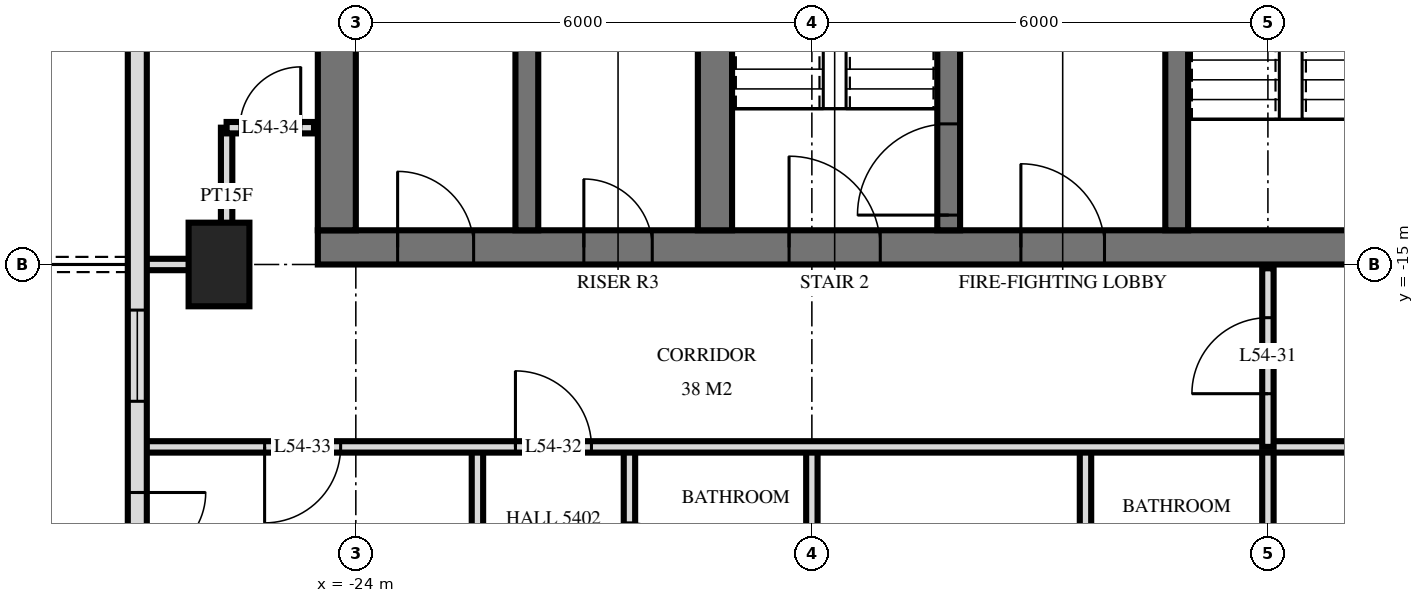
"""IFC4 building model, lengths in metres.
Left out: names, types, materials, properties, quantities, classifications, styles, units other than length and angle.
Written with IfcOpenShell. Run it as: python <this file> out.ifc"""

import sys

from ifc_helpers import new_model, si_unit, direction, frame, frame_2d, origin, origin_2d, place, context, subcontext, project, spatial, rectangle, extrude, element, fill, save


model = new_model("IFC4")
c1 = context("Model", 3, precision=1e-05, world=origin(), true_north=direction((0.0, 1.0)))
c2 = subcontext(c1, "Body", "Model", "MODEL_VIEW")
j1 = project(units=[si_unit("LENGTHUNIT", "METRE"), si_unit("PLANEANGLEUNIT", "RADIAN")], contexts=[c1])
p1 = place(None, origin())
s1 = spatial("IfcSite", under=j1, at=p1, CompositionType="ELEMENT")
p2 = place(p1, origin())
s2 = spatial("IfcBuilding", under=s1, at=p2, CompositionType="ELEMENT")
p3 = place(p2, frame((0.0, 0.0, 208.1)))
s3 = spatial("IfcBuildingStorey", under=s2, at=p3, CompositionType="ELEMENT", Elevation=208.1)
p4 = place(p3, frame((-25.8, -15.0, 0.0), z_axis=(0.0, 0.0, 1.0), x_axis=(0.0, 1.0, 0.0)))
e1 = element("IfcColumn", 1, at=p4, inside=s3, PredefinedType="COLUMN", context=c2, shape_type="SweptSolid", body=[
    extrude(rectangle(XDim=1.1, YDim=0.8, at=origin_2d()), origin(), (0.0, 0.0, 1.0), 3.5),
])
p5 = place(p3, frame((-24.5, -14.775, 0.0), z_axis=(0.0, 0.0, 1.0), x_axis=(1.0, 0.0, 0.0)))
e2 = element("IfcWall", 2, at=p5, inside=s3, PredefinedType="SHEAR", context=c2, shape_type="SweptSolid", body=[
    extrude(rectangle(XDim=14.5, YDim=0.45, at=frame_2d((7.25, 0.0))), origin(), (0.0, 0.0, 1.0), 3.5),
])
p6 = place(p5, frame((6.2, 0.0, 0.0)))
e3 = element("IfcOpeningElement", 3, at=p6, cuts=e2, PredefinedType="OPENING", context=c2, shape_type="SweptSolid", body=[
    extrude(rectangle(XDim=1.2, YDim=2.1, at=frame_2d((0.6, 1.05))), frame((0.0, 0.235, 0.0), z_axis=(0.0, -1.0, 0.0), x_axis=(1.0, 0.0, 0.0)), (0.0, 0.0, 1.0), 0.47),
])
p7 = place(p5, frame((9.25, 0.0, 0.0)))
e4 = element("IfcOpeningElement", 4, at=p7, cuts=e2, PredefinedType="OPENING", context=c2, shape_type="SweptSolid", body=[
    extrude(rectangle(XDim=1.1, YDim=2.1, at=frame_2d((0.55, 1.05))), frame((0.0, 0.235, 0.0), z_axis=(0.0, -1.0, 0.0), x_axis=(1.0, 0.0, 0.0)), (0.0, 0.0, 1.0), 0.47),
])
p8 = place(p5, frame((3.5, 0.0, 0.0)))
e5 = element("IfcOpeningElement", 5, at=p8, cuts=e2, PredefinedType="OPENING", context=c2, shape_type="SweptSolid", body=[
    extrude(rectangle(XDim=0.9, YDim=2.1, at=frame_2d((0.45, 1.05))), frame((0.0, 0.235, 0.0), z_axis=(0.0, -1.0, 0.0), x_axis=(1.0, 0.0, 0.0)), (0.0, 0.0, 1.0), 0.47),
])
p9 = place(p5, frame((1.05, 0.0, 0.0)))
e6 = element("IfcOpeningElement", 6, at=p9, cuts=e2, PredefinedType="OPENING", context=c2, shape_type="SweptSolid", body=[
    extrude(rectangle(XDim=1.0, YDim=2.1, at=frame_2d((0.5, 1.05))), frame((0.0, 0.235, 0.0), z_axis=(0.0, -1.0, 0.0), x_axis=(1.0, 0.0, 0.0)), (0.0, 0.0, 1.0), 0.47),
])
p10 = place(p3, frame((-24.25, -14.55, 0.0), z_axis=(0.0, 0.0, 1.0), x_axis=(0.0, 1.0, 0.0)))
e7 = element("IfcWall", 7, at=p10, inside=s3, PredefinedType="SHEAR", context=c2, shape_type="SweptSolid", body=[
    extrude(rectangle(XDim=14.1, YDim=0.5, at=frame_2d((7.05, 0.0))), origin(), (0.0, 0.0, 1.0), 3.5),
])
p11 = place(p3, frame((-13.2, -14.55, 0.0), z_axis=(0.0, 0.0, 1.0), x_axis=(0.0, 1.0, 0.0)))
e8 = element("IfcWall", 8, at=p11, inside=s3, PredefinedType="SHEAR", context=c2, shape_type="SweptSolid", body=[
    extrude(rectangle(XDim=5.4, YDim=0.3, at=frame_2d((2.7, 0.0))), origin(), (0.0, 0.0, 1.0), 3.5),
])
p12 = place(p11, frame((4.0, 0.0, 0.0)))
e9 = element("IfcOpeningElement", 9, at=p12, cuts=e8, PredefinedType="OPENING", context=c2, shape_type="SweptSolid", body=[
    extrude(rectangle(XDim=1.2, YDim=2.1, at=frame_2d((0.6, 1.05))), frame((0.0, 0.16, 0.0), z_axis=(0.0, -1.0, 0.0), x_axis=(1.0, 0.0, 0.0)), (0.0, 0.0, 1.0), 0.32),
])
p13 = place(p3, frame((-16.2, -14.55, 0.0), z_axis=(0.0, 0.0, 1.0), x_axis=(0.0, 1.0, 0.0)))
e10 = element("IfcWall", 10, at=p13, inside=s3, PredefinedType="SHEAR", context=c2, shape_type="SweptSolid", body=[
    extrude(rectangle(XDim=5.4, YDim=0.3, at=frame_2d((2.7, 0.0))), origin(), (0.0, 0.0, 1.0), 3.5),
])
p14 = place(p13, frame((0.2, 0.0, 0.0)))
e11 = element("IfcOpeningElement", 11, at=p14, cuts=e10, PredefinedType="OPENING", context=c2, shape_type="SweptSolid", body=[
    extrude(rectangle(XDim=1.2, YDim=2.1, at=frame_2d((0.6, 1.05))), frame((0.0, 0.16, 0.0), z_axis=(0.0, -1.0, 0.0), x_axis=(1.0, 0.0, 0.0)), (0.0, 0.0, 1.0), 0.32),
])
p15 = place(p3, frame((-19.275, -14.55, 0.0), z_axis=(0.0, 0.0, 1.0), x_axis=(0.0, 1.0, 0.0)))
e12 = element("IfcWall", 12, at=p15, inside=s3, PredefinedType="SHEAR", context=c2, shape_type="SweptSolid", body=[
    extrude(rectangle(XDim=5.4, YDim=0.45, at=frame_2d((2.7, 0.0))), origin(), (0.0, 0.0, 1.0), 3.5),
])
p16 = place(p3, frame((-21.75, -14.55, 0.0), z_axis=(0.0, 0.0, 1.0), x_axis=(0.0, 1.0, 0.0)))
e13 = element("IfcWall", 13, at=p16, inside=s3, PredefinedType="SHEAR", context=c2, shape_type="SweptSolid", body=[
    extrude(rectangle(XDim=5.4, YDim=0.3, at=frame_2d((2.7, 0.0))), origin(), (0.0, 0.0, 1.0), 3.5),
])
p17 = place(p3, frame((-26.875, -3.325, 0.0), z_axis=(0.0, 0.0, 1.0), x_axis=(0.0, -1.0, 0.0)))
e14 = element("IfcWall", 14, at=p17, inside=s3, PredefinedType="SOLIDWALL", context=c2, shape_type="SweptSolid", body=[
    extrude(rectangle(XDim=21.551, YDim=0.25, at=frame_2d((10.775, 0.0))), origin(), (0.0, 0.0, 1.0), 3.22),
])
p18 = place(p17, frame((6.65, 0.0, 0.0)))
e15 = element("IfcOpeningElement", 15, at=p18, cuts=e14, PredefinedType="OPENING", context=c2, shape_type="SweptSolid", body=[
    extrude(rectangle(XDim=1.8, YDim=2.4, at=frame_2d((0.9, 1.2))), frame((0.0, 0.135, 0.0), z_axis=(0.0, -1.0, 0.0), x_axis=(1.0, 0.0, 0.0)), (0.0, 0.0, 1.0), 0.27),
])
p19 = place(p17, frame((12.275, 0.0, 0.9)))
e16 = element("IfcOpeningElement", 16, at=p19, cuts=e14, PredefinedType="OPENING", context=c2, shape_type="SweptSolid", body=[
    extrude(rectangle(XDim=1.2, YDim=1.5, at=frame_2d((0.6, 0.75))), frame((0.0, 0.135, 0.0), z_axis=(0.0, -1.0, 0.0), x_axis=(1.0, 0.0, 0.0)), (0.0, 0.0, 1.0), 0.27),
])
p20 = place(p17, frame((14.675, 0.0, 0.0)))
e17 = element("IfcOpeningElement", 17, at=p20, cuts=e14, PredefinedType="OPENING", context=c2, shape_type="SweptSolid", body=[
    extrude(rectangle(XDim=1.8, YDim=2.4, at=frame_2d((0.9, 1.2))), frame((0.0, 0.135, 0.0), z_axis=(0.0, -1.0, 0.0), x_axis=(1.0, 0.0, 0.0)), (0.0, 0.0, 1.0), 0.27),
])
p21 = place(p17, frame((18.875, 0.0, 0.0)))
e18 = element("IfcOpeningElement", 18, at=p21, cuts=e14, PredefinedType="OPENING", context=c2, shape_type="SweptSolid", body=[
    extrude(rectangle(XDim=1.8, YDim=2.4, at=frame_2d((0.9, 1.2))), frame((0.0, 0.135, 0.0), z_axis=(0.0, -1.0, 0.0), x_axis=(1.0, 0.0, 0.0)), (0.0, 0.0, 1.0), 0.27),
])
p22 = place(p3, frame((-12.0, -17.4, 0.0), z_axis=(0.0, 0.0, 1.0), x_axis=(0.0, 1.0, 0.0)))
e19 = element("IfcWall", 19, at=p22, inside=s3, PredefinedType="PARTITIONING", context=c2, shape_type="SweptSolid", body=[
    extrude(rectangle(XDim=2.35, YDim=0.15, at=frame_2d((1.175, 0.0))), origin(), (0.0, 0.0, 1.0), 3.22),
])
p23 = place(p22, frame((0.7, 0.0, 0.0)))
e20 = element("IfcOpeningElement", 20, at=p23, cuts=e19, PredefinedType="OPENING", context=c2, shape_type="SweptSolid", body=[
    extrude(rectangle(XDim=1.0, YDim=2.1, at=frame_2d((0.5, 1.05))), frame((0.0, 0.085, 0.0), z_axis=(0.0, -1.0, 0.0), x_axis=(1.0, 0.0, 0.0)), (0.0, 0.0, 1.0), 0.17),
])
p24 = place(p3, frame((-12.0, -29.22, 0.0), z_axis=(0.0, 0.0, 1.0), x_axis=(0.0, 1.0, 0.0)))
e21 = element("IfcWall", 21, at=p24, inside=s3, PredefinedType="PARTITIONING", context=c2, shape_type="SweptSolid", body=[
    extrude(rectangle(XDim=11.82, YDim=0.15, at=frame_2d((5.91, 0.0))), origin(), (0.0, 0.0, 1.0), 3.22),
])
for number, where, z_axis, x_axis in (
    (22, (-14.4, -20.4, 0.0), (0.0, 0.0, 1.0), (0.0, 1.0, 0.0)),
    (23, (-18.0, -20.4, 0.0), (0.0, 0.0, 1.0), (0.0, 1.0, 0.0)),
):
    element("IfcWall", number, at=place(p3, frame(where, z_axis=z_axis, x_axis=x_axis)), inside=s3, PredefinedType="PARTITIONING", context=c2, shape_type="SweptSolid", body=[
        extrude(rectangle(XDim=3.0, YDim=0.15, at=frame_2d((1.5, 0.0))), origin(), (0.0, 0.0, 1.0), 3.22),
    ])
p25 = place(p3, frame((-20.4, -20.4, 0.0), z_axis=(0.0, 0.0, 1.0), x_axis=(0.0, 1.0, 0.0)))
e24 = element("IfcWall", 24, at=p25, inside=s3, PredefinedType="PARTITIONING", context=c2, shape_type="SweptSolid", body=[
    extrude(rectangle(XDim=3.0, YDim=0.15, at=frame_2d((1.5, 0.0))), origin(), (0.0, 0.0, 1.0), 3.22),
])
p26 = place(p25, frame((1.0, 0.0, 0.0)))
e25 = element("IfcOpeningElement", 25, at=p26, cuts=e24, PredefinedType="OPENING", context=c2, shape_type="SweptSolid", body=[
    extrude(rectangle(XDim=1.0, YDim=2.1, at=frame_2d((0.5, 1.05))), frame((0.0, 0.085, 0.0), z_axis=(0.0, -1.0, 0.0), x_axis=(1.0, 0.0, 0.0)), (0.0, 0.0, 1.0), 0.17),
])
p27 = place(p3, frame((-22.4, -20.4, 0.0), z_axis=(0.0, 0.0, 1.0), x_axis=(0.0, 1.0, 0.0)))
e26 = element("IfcWall", 26, at=p27, inside=s3, PredefinedType="PARTITIONING", context=c2, shape_type="SweptSolid", body=[
    extrude(rectangle(XDim=3.0, YDim=0.15, at=frame_2d((1.5, 0.0))), origin(), (0.0, 0.0, 1.0), 3.22),
])
p28 = place(p3, frame((-25.7, -15.0, 0.0), z_axis=(0.0, 0.0, 1.0), x_axis=(0.0, 1.0, 0.0)))
e27 = element("IfcWall", 27, at=p28, inside=s3, PredefinedType="PARTITIONING", context=c2, shape_type="SweptSolid", body=[
    extrude(rectangle(XDim=1.8, YDim=0.15, at=frame_2d((0.9, 0.0))), origin(), (0.0, 0.0, 1.0), 3.22),
])
p29 = place(p3, frame((-26.82, -17.4, 0.0), z_axis=(0.0, 0.0, 1.0), x_axis=(1.0, 0.0, 0.0)))
e28 = element("IfcWall", 28, at=p29, inside=s3, PredefinedType="PARTITIONING", context=c2, shape_type="SweptSolid", body=[
    extrude(rectangle(XDim=53.64, YDim=0.15, at=frame_2d((26.82, 0.0))), origin(), (0.0, 0.0, 1.0), 3.22),
])
p30 = place(p29, frame((4.92, 0.0, 0.0)))
e29 = element("IfcOpeningElement", 29, at=p30, cuts=e28, PredefinedType="OPENING", context=c2, shape_type="SweptSolid", body=[
    extrude(rectangle(XDim=1.0, YDim=2.1, at=frame_2d((0.5, 1.05))), frame((0.0, 0.085, 0.0), z_axis=(0.0, -1.0, 0.0), x_axis=(1.0, 0.0, 0.0)), (0.0, 0.0, 1.0), 0.17),
])
p31 = place(p29, frame((1.62, 0.0, 0.0)))
e30 = element("IfcOpeningElement", 30, at=p31, cuts=e28, PredefinedType="OPENING", context=c2, shape_type="SweptSolid", body=[
    extrude(rectangle(XDim=1.0, YDim=2.1, at=frame_2d((0.5, 1.05))), frame((0.0, 0.085, 0.0), z_axis=(0.0, -1.0, 0.0), x_axis=(1.0, 0.0, 0.0)), (0.0, 0.0, 1.0), 0.17),
])
p32 = place(p29, frame((41.17, 0.0, 0.0)))
e31 = element("IfcOpeningElement", 31, at=p32, cuts=e28, PredefinedType="OPENING", context=c2, shape_type="SweptSolid", body=[
    extrude(rectangle(XDim=1.0, YDim=2.1, at=frame_2d((0.5, 1.05))), frame((0.0, 0.085, 0.0), z_axis=(0.0, -1.0, 0.0), x_axis=(1.0, 0.0, 0.0)), (0.0, 0.0, 1.0), 0.17),
])
p33 = place(p29, frame((49.42, 0.0, 0.0)))
e32 = element("IfcOpeningElement", 32, at=p33, cuts=e28, PredefinedType="OPENING", context=c2, shape_type="SweptSolid", body=[
    extrude(rectangle(XDim=1.0, YDim=2.1, at=frame_2d((0.5, 1.05))), frame((0.0, 0.085, 0.0), z_axis=(0.0, -1.0, 0.0), x_axis=(1.0, 0.0, 0.0)), (0.0, 0.0, 1.0), 0.17),
])
p34 = place(p29, frame((47.62, 0.0, 0.0)))
e33 = element("IfcOpeningElement", 33, at=p34, cuts=e28, PredefinedType="OPENING", context=c2, shape_type="SweptSolid", body=[
    extrude(rectangle(XDim=1.0, YDim=2.1, at=frame_2d((0.5, 1.05))), frame((0.0, 0.085, 0.0), z_axis=(0.0, -1.0, 0.0), x_axis=(1.0, 0.0, 0.0)), (0.0, 0.0, 1.0), 0.17),
])
p35 = place(p29, frame((21.82, 0.0, 0.0)))
e34 = element("IfcOpeningElement", 34, at=p35, cuts=e28, PredefinedType="OPENING", context=c2, shape_type="SweptSolid", body=[
    extrude(rectangle(XDim=1.0, YDim=2.1, at=frame_2d((0.5, 1.05))), frame((0.0, 0.085, 0.0), z_axis=(0.0, -1.0, 0.0), x_axis=(1.0, 0.0, 0.0)), (0.0, 0.0, 1.0), 0.17),
])
p36 = place(p29, frame((33.82, 0.0, 0.0)))
e35 = element("IfcOpeningElement", 35, at=p36, cuts=e28, PredefinedType="OPENING", context=c2, shape_type="SweptSolid", body=[
    extrude(rectangle(XDim=1.0, YDim=2.1, at=frame_2d((0.5, 1.05))), frame((0.0, 0.085, 0.0), z_axis=(0.0, -1.0, 0.0), x_axis=(1.0, 0.0, 0.0)), (0.0, 0.0, 1.0), 0.17),
])
p37 = place(p3, frame((-26.82, -15.0, 0.0), z_axis=(0.0, 0.0, 1.0), x_axis=(1.0, 0.0, 0.0)))
e36 = element("IfcWall", 36, at=p37, inside=s3, PredefinedType="PARTITIONING", context=c2, shape_type="SweptSolid", body=[
    extrude(rectangle(XDim=1.12, YDim=0.15, at=frame_2d((0.56, 0.0))), origin(), (0.0, 0.0, 1.0), 3.22),
])
p38 = place(p3, frame((-25.7, -13.2, 0.0), z_axis=(0.0, 0.0, 1.0), x_axis=(1.0, 0.0, 0.0)))
e37 = element("IfcWall", 37, at=p38, inside=s3, PredefinedType="PARTITIONING", context=c2, shape_type="SweptSolid", body=[
    extrude(rectangle(XDim=1.15, YDim=0.15, at=frame_2d((0.575, 0.0))), origin(), (0.0, 0.0, 1.0), 3.22),
])
p39 = place(p38, frame((0.175, 0.0, 0.0)))
e38 = element("IfcOpeningElement", 38, at=p39, cuts=e37, PredefinedType="OPENING", context=c2, shape_type="SweptSolid", body=[
    extrude(rectangle(XDim=0.8, YDim=2.1, at=frame_2d((0.4, 1.05))), frame((0.0, 0.085, 0.0), z_axis=(0.0, -1.0, 0.0), x_axis=(1.0, 0.0, 0.0)), (0.0, 0.0, 1.0), 0.17),
])
p40 = place(p19, origin())
e39 = element("IfcWindow", 39, at=p40, inside=s3, PartitioningType="SINGLE_PANEL", PredefinedType="WINDOW", context=c2, shape_type="SweptSolid", body=[
    extrude(rectangle(XDim=1.2, YDim=1.5, at=frame_2d((0.6, 0.75))), frame((0.0, 0.03, 0.0), z_axis=(0.0, -1.0, 0.0), x_axis=(1.0, 0.0, 0.0)), (0.0, 0.0, 1.0), 0.06),
])
fill(e16, e39)
p41 = place(p20, origin())
e40 = element("IfcDoor", 40, at=p41, inside=s3, OperationType="DOUBLE_DOOR_SINGLE_SWING", PredefinedType="DOOR", context=c2, shape_type="SweptSolid", body=[
    extrude(rectangle(XDim=1.8, YDim=2.4, at=frame_2d((0.9, 1.2))), frame((0.0, 0.025, 0.0), z_axis=(0.0, -1.0, 0.0), x_axis=(1.0, 0.0, 0.0)), (0.0, 0.0, 1.0), 0.05),
])
fill(e17, e40)
p42 = place(p6, origin())
e41 = element("IfcDoor", 41, at=p42, inside=s3, OperationType="SINGLE_SWING_RIGHT", PredefinedType="DOOR", context=c2, shape_type="SweptSolid", body=[
    extrude(rectangle(XDim=1.2, YDim=2.1, at=frame_2d((0.6, 1.05))), frame((0.0, 0.025, 0.0), z_axis=(0.0, -1.0, 0.0), x_axis=(1.0, 0.0, 0.0)), (0.0, 0.0, 1.0), 0.05),
])
fill(e3, e41)
p43 = place(p7, origin())
e42 = element("IfcDoor", 42, at=p43, inside=s3, OperationType="SINGLE_SWING_RIGHT", PredefinedType="DOOR", context=c2, shape_type="SweptSolid", body=[
    extrude(rectangle(XDim=1.1, YDim=2.1, at=frame_2d((0.55, 1.05))), frame((0.0, 0.025, 0.0), z_axis=(0.0, -1.0, 0.0), x_axis=(1.0, 0.0, 0.0)), (0.0, 0.0, 1.0), 0.05),
])
fill(e4, e42)
p44 = place(p8, origin())
e43 = element("IfcDoor", 43, at=p44, inside=s3, OperationType="SINGLE_SWING_RIGHT", PredefinedType="DOOR", context=c2, shape_type="SweptSolid", body=[
    extrude(rectangle(XDim=0.9, YDim=2.1, at=frame_2d((0.45, 1.05))), frame((0.0, 0.025, 0.0), z_axis=(0.0, -1.0, 0.0), x_axis=(1.0, 0.0, 0.0)), (0.0, 0.0, 1.0), 0.05),
])
fill(e5, e43)
p45 = place(p9, origin())
e44 = element("IfcDoor", 44, at=p45, inside=s3, OperationType="SINGLE_SWING_RIGHT", PredefinedType="DOOR", context=c2, shape_type="SweptSolid", body=[
    extrude(rectangle(XDim=1.0, YDim=2.1, at=frame_2d((0.5, 1.05))), frame((0.0, 0.025, 0.0), z_axis=(0.0, -1.0, 0.0), x_axis=(1.0, 0.0, 0.0)), (0.0, 0.0, 1.0), 0.05),
])
fill(e6, e44)
p46 = place(p14, origin())
e45 = element("IfcDoor", 45, at=p46, inside=s3, OperationType="SINGLE_SWING_RIGHT", PredefinedType="DOOR", context=c2, shape_type="SweptSolid", body=[
    extrude(rectangle(XDim=1.2, YDim=2.1, at=frame_2d((0.6, 1.05))), frame((0.0, 0.025, 0.0), z_axis=(0.0, -1.0, 0.0), x_axis=(1.0, 0.0, 0.0)), (0.0, 0.0, 1.0), 0.05),
])
fill(e11, e45)
p47 = place(p23, origin())
e46 = element("IfcDoor", 46, at=p47, inside=s3, OperationType="SINGLE_SWING_RIGHT", PredefinedType="DOOR", context=c2, shape_type="SweptSolid", body=[
    extrude(rectangle(XDim=1.0, YDim=2.1, at=frame_2d((0.5, 1.05))), frame((0.0, 0.025, 0.0), z_axis=(0.0, -1.0, 0.0), x_axis=(1.0, 0.0, 0.0)), (0.0, 0.0, 1.0), 0.05),
])
fill(e20, e46)
p48 = place(p30, origin())
e47 = element("IfcDoor", 47, at=p48, inside=s3, OperationType="SINGLE_SWING_RIGHT", PredefinedType="DOOR", context=c2, shape_type="SweptSolid", body=[
    extrude(rectangle(XDim=1.0, YDim=2.1, at=frame_2d((0.5, 1.05))), frame((0.0, 0.025, 0.0), z_axis=(0.0, -1.0, 0.0), x_axis=(1.0, 0.0, 0.0)), (0.0, 0.0, 1.0), 0.05),
])
fill(e29, e47)
p49 = place(p31, frame((0.5, 0.0, 0.0), z_axis=(0.0, 0.0, 1.0), x_axis=(-1.0, 0.0, 0.0)))
e48 = element("IfcDoor", 48, at=p49, inside=s3, OperationType="SINGLE_SWING_LEFT", PredefinedType="DOOR", context=c2, shape_type="SweptSolid", body=[
    extrude(rectangle(XDim=1.0, YDim=2.1, at=frame_2d((0.0, 1.05))), frame((0.0, -0.025, 0.0), z_axis=(0.0, 1.0, 0.0), x_axis=(-1.0, 0.0, 0.0)), (0.0, 0.0, 1.0), 0.05),
])
fill(e30, e48)
p50 = place(p39, origin())
e49 = element("IfcDoor", 49, at=p50, inside=s3, OperationType="SINGLE_SWING_LEFT", PredefinedType="DOOR", context=c2, shape_type="SweptSolid", body=[
    extrude(rectangle(XDim=0.8, YDim=2.1, at=frame_2d((0.4, 1.05))), frame((0.0, 0.025, 0.0), z_axis=(0.0, -1.0, 0.0), x_axis=(1.0, 0.0, 0.0)), (0.0, 0.0, 1.0), 0.05),
])
fill(e38, e49)
save(model, sys.argv[1])
